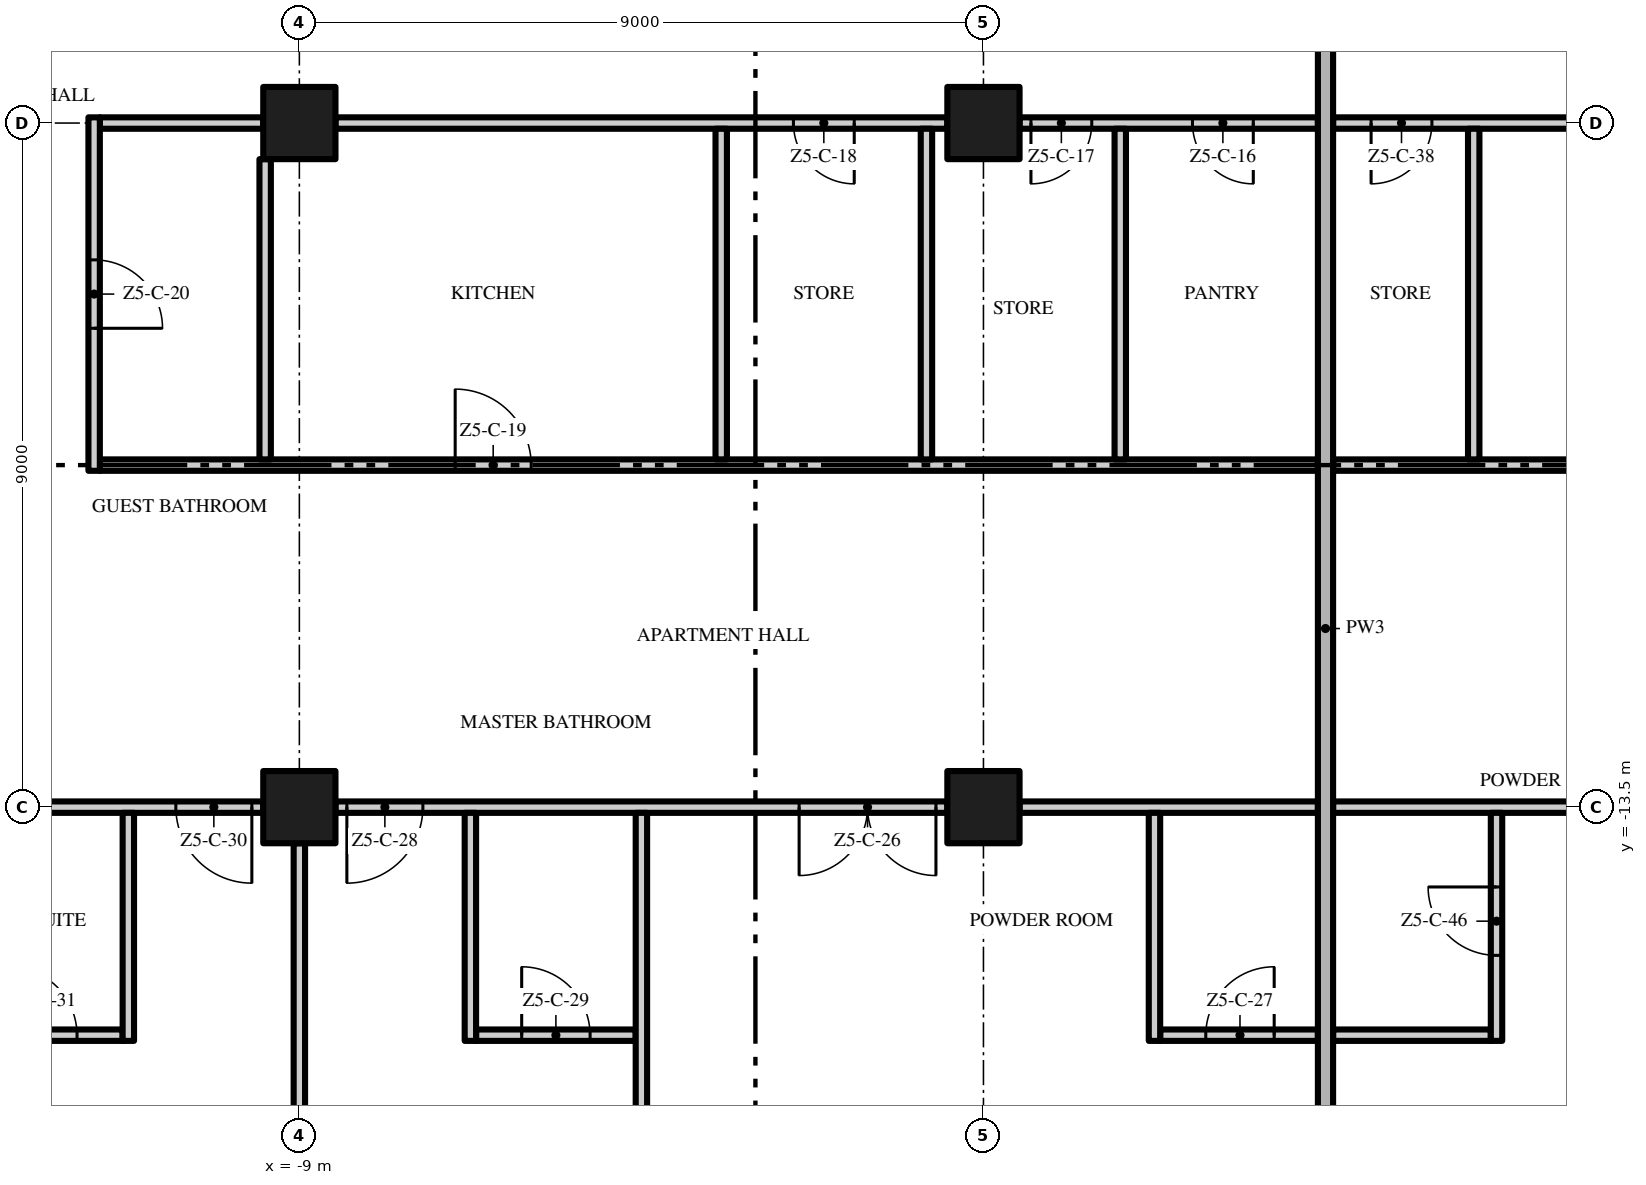
"""IFC4 building model, lengths in metres.
Left out: names, types, materials, properties, quantities, classifications, styles, units other than length and angle.
Written with IfcOpenShell. Run it as: python <this file> out.ifc"""

import sys

from ifc_helpers import new_model, si_unit, direction, frame, frame_2d, origin, origin_2d, place, context, subcontext, project, spatial, rectangle, extrude, element, fill, save


model = new_model("IFC4")
c1 = context("Model", 3, precision=1e-05, world=origin(), true_north=direction((0.0, 1.0)))
c2 = subcontext(c1, "Body", "Model", "MODEL_VIEW")
j1 = project(units=[si_unit("LENGTHUNIT", "METRE"), si_unit("PLANEANGLEUNIT", "RADIAN")], contexts=[c1])
p1 = place(None, origin())
s1 = spatial("IfcSite", under=j1, at=p1, CompositionType="ELEMENT")
p2 = place(p1, origin())
s2 = spatial("IfcBuilding", under=s1, at=p2, CompositionType="ELEMENT")
p3 = place(p2, frame((0.0, 0.0, 261.6)))
s3 = spatial("IfcBuildingStorey", under=s2, at=p3, CompositionType="ELEMENT", Elevation=261.6)
for number, where, z_axis, x_axis in (
    (1, (-9.0, -13.5, 0.0), (0.0, 0.0, 1.0), (1.0, 0.0, 0.0)),
    (2, (-9.0, -4.5, 0.0), (0.0, 0.0, 1.0), (1.0, 0.0, 0.0)),
    (3, (0.0, -13.5, 0.0), (0.0, 0.0, 1.0), (1.0, 0.0, 0.0)),
    (4, (0.0, -4.5, 0.0), (0.0, 0.0, 1.0), (1.0, 0.0, 0.0)),
):
    element("IfcColumn", number, at=place(p3, frame(where, z_axis=z_axis, x_axis=x_axis)), inside=s3, PredefinedType="COLUMN", context=c2, shape_type="SweptSolid", body=[
        extrude(rectangle(XDim=0.95, YDim=0.95, at=origin_2d()), origin(), (0.0, 0.0, 1.0), 3.5),
    ])
p4 = place(p3, frame((-13.425, -16.5, 0.0), z_axis=(0.0, 0.0, 1.0), x_axis=(1.0, 0.0, 0.0)))
e5 = element("IfcWall", 5, at=p4, inside=s3, PredefinedType="PARTITIONING", context=c2, shape_type="SweptSolid", body=[
    extrude(rectangle(XDim=2.1, YDim=0.15, at=frame_2d((1.05, 0.0))), origin(), (0.0, 0.0, 1.0), 3.5),
])
p5 = place(p4, frame((0.6, 0.0, 0.0)))
e6 = element("IfcOpeningElement", 6, at=p5, cuts=e5, PredefinedType="OPENING", context=c2, shape_type="SweptSolid", body=[
    extrude(rectangle(XDim=0.9, YDim=2.1, at=frame_2d((0.45, 1.05))), frame((0.0, 0.085, 0.0), z_axis=(0.0, -1.0, 0.0), x_axis=(1.0, 0.0, 0.0)), (0.0, 0.0, 1.0), 0.17),
])
p6 = place(p3, frame((-6.675, -16.5, 0.0), z_axis=(0.0, 0.0, 1.0), x_axis=(1.0, 0.0, 0.0)))
e7 = element("IfcWall", 7, at=p6, inside=s3, PredefinedType="PARTITIONING", context=c2, shape_type="SweptSolid", body=[
    extrude(rectangle(XDim=2.1, YDim=0.15, at=frame_2d((1.05, 0.0))), origin(), (0.0, 0.0, 1.0), 3.5),
])
p7 = place(p6, frame((0.6, 0.0, 0.0)))
e8 = element("IfcOpeningElement", 8, at=p7, cuts=e7, PredefinedType="OPENING", context=c2, shape_type="SweptSolid", body=[
    extrude(rectangle(XDim=0.9, YDim=2.1, at=frame_2d((0.45, 1.05))), frame((0.0, 0.085, 0.0), z_axis=(0.0, -1.0, 0.0), x_axis=(1.0, 0.0, 0.0)), (0.0, 0.0, 1.0), 0.17),
])
p8 = place(p3, frame((2.325, -16.5, 0.0), z_axis=(0.0, 0.0, 1.0), x_axis=(1.0, 0.0, 0.0)))
e9 = element("IfcWall", 9, at=p8, inside=s3, PredefinedType="PARTITIONING", context=c2, shape_type="SweptSolid", body=[
    extrude(rectangle(XDim=2.075, YDim=0.15, at=frame_2d((1.038, 0.0))), origin(), (0.0, 0.0, 1.0), 3.5),
])
p9 = place(p8, frame((0.6, 0.0, 0.0)))
e10 = element("IfcOpeningElement", 10, at=p9, cuts=e9, PredefinedType="OPENING", context=c2, shape_type="SweptSolid", body=[
    extrude(rectangle(XDim=0.9, YDim=2.1, at=frame_2d((0.45, 1.05))), frame((0.0, 0.085, 0.0), z_axis=(0.0, -1.0, 0.0), x_axis=(1.0, 0.0, 0.0)), (0.0, 0.0, 1.0), 0.17),
])
p10 = place(p3, frame((4.6, -16.5, 0.0), z_axis=(0.0, 0.0, 1.0), x_axis=(1.0, 0.0, 0.0)))
e11 = element("IfcWall", 11, at=p10, inside=s3, PredefinedType="PARTITIONING", context=c2, shape_type="SweptSolid", body=[
    extrude(rectangle(XDim=2.075, YDim=0.15, at=frame_2d((1.038, 0.0))), origin(), (0.0, 0.0, 1.0), 3.5),
])
p11 = place(p3, frame((-9.475, -13.5, 0.0), z_axis=(0.0, 0.0, 1.0), x_axis=(-1.0, 0.0, 0.0)))
e12 = element("IfcWall", 12, at=p11, inside=s3, PredefinedType="PARTITIONING", context=c2, shape_type="SweptSolid", body=[
    extrude(rectangle(XDim=8.05, YDim=0.15, at=frame_2d((4.025, 0.0))), origin(), (0.0, 0.0, 1.0), 3.5),
])
p12 = place(p11, frame((0.15, 0.0, 0.0)))
e13 = element("IfcOpeningElement", 13, at=p12, cuts=e12, PredefinedType="OPENING", context=c2, shape_type="SweptSolid", body=[
    extrude(rectangle(XDim=1.0, YDim=2.4, at=frame_2d((0.5, 1.2))), frame((0.0, 0.085, 0.0), z_axis=(0.0, -1.0, 0.0), x_axis=(1.0, 0.0, 0.0)), (0.0, 0.0, 1.0), 0.17),
])
p13 = place(p11, frame((6.9, 0.0, 0.0)))
e14 = element("IfcOpeningElement", 14, at=p13, cuts=e12, PredefinedType="OPENING", context=c2, shape_type="SweptSolid", body=[
    extrude(rectangle(XDim=1.0, YDim=2.4, at=frame_2d((0.5, 1.2))), frame((0.0, 0.085, 0.0), z_axis=(0.0, -1.0, 0.0), x_axis=(1.0, 0.0, 0.0)), (0.0, 0.0, 1.0), 0.17),
])
p14 = place(p3, frame((-0.475, -13.5, 0.0), z_axis=(0.0, 0.0, 1.0), x_axis=(-1.0, 0.0, 0.0)))
e15 = element("IfcWall", 15, at=p14, inside=s3, PredefinedType="PARTITIONING", context=c2, shape_type="SweptSolid", body=[
    extrude(rectangle(XDim=8.05, YDim=0.15, at=frame_2d((4.025, 0.0))), origin(), (0.0, 0.0, 1.0), 3.5),
])
p15 = place(p14, frame((0.15, 0.0, 0.0)))
e16 = element("IfcOpeningElement", 16, at=p15, cuts=e15, PredefinedType="OPENING", context=c2, shape_type="SweptSolid", body=[
    extrude(rectangle(XDim=1.8, YDim=2.4, at=frame_2d((0.9, 1.2))), frame((0.0, 0.085, 0.0), z_axis=(0.0, -1.0, 0.0), x_axis=(1.0, 0.0, 0.0)), (0.0, 0.0, 1.0), 0.17),
])
p16 = place(p14, frame((6.9, 0.0, 0.0)))
e17 = element("IfcOpeningElement", 17, at=p16, cuts=e15, PredefinedType="OPENING", context=c2, shape_type="SweptSolid", body=[
    extrude(rectangle(XDim=1.0, YDim=2.4, at=frame_2d((0.5, 1.2))), frame((0.0, 0.085, 0.0), z_axis=(0.0, -1.0, 0.0), x_axis=(1.0, 0.0, 0.0)), (0.0, 0.0, 1.0), 0.17),
])
for number, where, z_axis, x_axis in (
    (18, (0.475, -13.5, 0.0), (0.0, 0.0, 1.0), (1.0, 0.0, 0.0)),
    (19, (4.6, -13.5, 0.0), (0.0, 0.0, 1.0), (1.0, 0.0, 0.0)),
):
    element("IfcWall", number, at=place(p3, frame(where, z_axis=z_axis, x_axis=x_axis)), inside=s3, PredefinedType="PARTITIONING", context=c2, shape_type="SweptSolid", body=[
        extrude(rectangle(XDim=3.925, YDim=0.15, at=frame_2d((1.962, 0.0))), origin(), (0.0, 0.0, 1.0), 3.5),
    ])
p17 = place(p3, frame((-11.625, -9.0, 0.0), z_axis=(0.0, 0.0, 1.0), x_axis=(1.0, 0.0, 0.0)))
e20 = element("IfcWall", 20, at=p17, inside=s3, PredefinedType="PARTITIONING", context=c2, shape_type="SweptSolid", body=[
    extrude(rectangle(XDim=16.025, YDim=0.15, at=frame_2d((8.012, 0.0))), origin(), (0.0, 0.0, 1.0), 3.5),
])
p18 = place(p17, frame((4.675, 0.0, 0.0)))
e21 = element("IfcOpeningElement", 21, at=p18, cuts=e20, PredefinedType="OPENING", context=c2, shape_type="SweptSolid", body=[
    extrude(rectangle(XDim=1.0, YDim=2.4, at=frame_2d((0.5, 1.2))), frame((0.0, 0.085, 0.0), z_axis=(0.0, -1.0, 0.0), x_axis=(1.0, 0.0, 0.0)), (0.0, 0.0, 1.0), 0.17),
])
p19 = place(p3, frame((4.6, -9.0, 0.0), z_axis=(0.0, 0.0, 1.0), x_axis=(1.0, 0.0, 0.0)))
e22 = element("IfcWall", 22, at=p19, inside=s3, PredefinedType="PARTITIONING", context=c2, shape_type="SweptSolid", body=[
    extrude(rectangle(XDim=10.025, YDim=0.15, at=frame_2d((5.013, 0.0))), origin(), (0.0, 0.0, 1.0), 3.5),
])
p20 = place(p19, frame((4.35, 0.0, 0.0)))
e23 = element("IfcOpeningElement", 23, at=p20, cuts=e22, PredefinedType="OPENING", context=c2, shape_type="SweptSolid", body=[
    extrude(rectangle(XDim=1.0, YDim=2.4, at=frame_2d((0.5, 1.2))), frame((0.0, 0.085, 0.0), z_axis=(0.0, -1.0, 0.0), x_axis=(1.0, 0.0, 0.0)), (0.0, 0.0, 1.0), 0.17),
])
p21 = place(p3, frame((-11.625, -4.5, 0.0), z_axis=(0.0, 0.0, 1.0), x_axis=(1.0, 0.0, 0.0)))
e24 = element("IfcWall", 24, at=p21, inside=s3, PredefinedType="PARTITIONING", context=c2, shape_type="SweptSolid", body=[
    extrude(rectangle(XDim=2.15, YDim=0.15, at=frame_2d((1.075, 0.0))), origin(), (0.0, 0.0, 1.0), 3.5),
])
p22 = place(p3, frame((-0.475, -4.5, 0.0), z_axis=(0.0, 0.0, 1.0), x_axis=(-1.0, 0.0, 0.0)))
e25 = element("IfcWall", 25, at=p22, inside=s3, PredefinedType="PARTITIONING", context=c2, shape_type="SweptSolid", body=[
    extrude(rectangle(XDim=8.05, YDim=0.15, at=frame_2d((4.025, 0.0))), origin(), (0.0, 0.0, 1.0), 3.5),
])
p23 = place(p22, frame((1.225, 0.0, 0.0)))
e26 = element("IfcOpeningElement", 26, at=p23, cuts=e25, PredefinedType="OPENING", context=c2, shape_type="SweptSolid", body=[
    extrude(rectangle(XDim=0.8, YDim=2.0, at=frame_2d((0.4, 1.0))), frame((0.0, 0.085, 0.0), z_axis=(0.0, -1.0, 0.0), x_axis=(1.0, 0.0, 0.0)), (0.0, 0.0, 1.0), 0.17),
])
p24 = place(p3, frame((4.4, -4.5, 0.0), z_axis=(0.0, 0.0, 1.0), x_axis=(-1.0, 0.0, 0.0)))
e27 = element("IfcWall", 27, at=p24, inside=s3, PredefinedType="PARTITIONING", context=c2, shape_type="SweptSolid", body=[
    extrude(rectangle(XDim=3.925, YDim=0.15, at=frame_2d((1.962, 0.0))), origin(), (0.0, 0.0, 1.0), 3.5),
])
p25 = place(p24, frame((0.85, 0.0, 0.0)))
e28 = element("IfcOpeningElement", 28, at=p25, cuts=e27, PredefinedType="OPENING", context=c2, shape_type="SweptSolid", body=[
    extrude(rectangle(XDim=0.8, YDim=2.0, at=frame_2d((0.4, 1.0))), frame((0.0, 0.085, 0.0), z_axis=(0.0, -1.0, 0.0), x_axis=(1.0, 0.0, 0.0)), (0.0, 0.0, 1.0), 0.17),
])
p26 = place(p24, frame((2.975, 0.0, 0.0)))
e29 = element("IfcOpeningElement", 29, at=p26, cuts=e27, PredefinedType="OPENING", context=c2, shape_type="SweptSolid", body=[
    extrude(rectangle(XDim=0.8, YDim=2.0, at=frame_2d((0.4, 1.0))), frame((0.0, 0.085, 0.0), z_axis=(0.0, -1.0, 0.0), x_axis=(1.0, 0.0, 0.0)), (0.0, 0.0, 1.0), 0.17),
])
p27 = place(p3, frame((8.525, -4.5, 0.0), z_axis=(0.0, 0.0, 1.0), x_axis=(-1.0, 0.0, 0.0)))
e30 = element("IfcWall", 30, at=p27, inside=s3, PredefinedType="PARTITIONING", context=c2, shape_type="SweptSolid", body=[
    extrude(rectangle(XDim=3.925, YDim=0.15, at=frame_2d((1.962, 0.0))), origin(), (0.0, 0.0, 1.0), 3.5),
])
p28 = place(p27, frame((2.625, 0.0, 0.0)))
e31 = element("IfcOpeningElement", 31, at=p28, cuts=e30, PredefinedType="OPENING", context=c2, shape_type="SweptSolid", body=[
    extrude(rectangle(XDim=0.8, YDim=2.0, at=frame_2d((0.4, 1.0))), frame((0.0, 0.085, 0.0), z_axis=(0.0, -1.0, 0.0), x_axis=(1.0, 0.0, 0.0)), (0.0, 0.0, 1.0), 0.17),
])
p29 = place(p3, frame((-11.7, -4.425, 0.0), z_axis=(0.0, 0.0, 1.0), x_axis=(0.0, -1.0, 0.0)))
e32 = element("IfcWall", 32, at=p29, inside=s3, PredefinedType="PARTITIONING", context=c2, shape_type="SweptSolid", body=[
    extrude(rectangle(XDim=4.65, YDim=0.15, at=frame_2d((2.325, 0.0))), origin(), (0.0, 0.0, 1.0), 3.5),
])
p30 = place(p29, frame((1.875, 0.0, 0.0)))
e33 = element("IfcOpeningElement", 33, at=p30, cuts=e32, PredefinedType="OPENING", context=c2, shape_type="SweptSolid", body=[
    extrude(rectangle(XDim=0.9, YDim=2.1, at=frame_2d((0.45, 1.05))), frame((0.0, 0.085, 0.0), z_axis=(0.0, -1.0, 0.0), x_axis=(1.0, 0.0, 0.0)), (0.0, 0.0, 1.0), 0.17),
])
p31 = place(p3, frame((-11.25, -16.575, 0.0), z_axis=(0.0, 0.0, 1.0), x_axis=(0.0, 1.0, 0.0)))
e34 = element("IfcWall", 34, at=p31, inside=s3, PredefinedType="PARTITIONING", context=c2, shape_type="SweptSolid", body=[
    extrude(rectangle(XDim=3.0, YDim=0.15, at=frame_2d((1.5, 0.0))), origin(), (0.0, 0.0, 1.0), 3.5),
])
p32 = place(p3, frame((-9.45, -8.925, 0.0), z_axis=(0.0, 0.0, 1.0), x_axis=(0.0, 1.0, 0.0)))
e35 = element("IfcWall", 35, at=p32, inside=s3, PredefinedType="PARTITIONING", context=c2, shape_type="SweptSolid", body=[
    extrude(rectangle(XDim=3.95, YDim=0.15, at=frame_2d((1.975, 0.0))), origin(), (0.0, 0.0, 1.0), 3.5),
])
p33 = place(p3, frame((-9.0, -21.6, 0.0), z_axis=(0.0, 0.0, 1.0), x_axis=(0.0, 1.0, 0.0)))
e36 = element("IfcWall", 36, at=p33, inside=s3, PredefinedType="PARTITIONING", context=c2, shape_type="SweptSolid", body=[
    extrude(rectangle(XDim=7.625, YDim=0.15, at=frame_2d((3.812, 0.0))), origin(), (0.0, 0.0, 1.0), 3.5),
])
p34 = place(p3, frame((-6.75, -16.575, 0.0), z_axis=(0.0, 0.0, 1.0), x_axis=(0.0, 1.0, 0.0)))
e37 = element("IfcWall", 37, at=p34, inside=s3, PredefinedType="PARTITIONING", context=c2, shape_type="SweptSolid", body=[
    extrude(rectangle(XDim=3.0, YDim=0.15, at=frame_2d((1.5, 0.0))), origin(), (0.0, 0.0, 1.0), 3.5),
])
p35 = place(p3, frame((-4.5, -22.2, 0.0), z_axis=(0.0, 0.0, 1.0), x_axis=(0.0, 1.0, 0.0)))
e38 = element("IfcWall", 38, at=p35, inside=s3, PredefinedType="PARTITIONING", context=c2, shape_type="SweptSolid", body=[
    extrude(rectangle(XDim=8.625, YDim=0.15, at=frame_2d((4.312, 0.0))), origin(), (0.0, 0.0, 1.0), 3.5),
])
for number, where, z_axis, x_axis in (
    (39, (-3.45, -8.925, 0.0), (0.0, 0.0, 1.0), (0.0, 1.0, 0.0)),
    (40, (-0.75, -8.925, 0.0), (0.0, 0.0, 1.0), (0.0, 1.0, 0.0)),
    (41, (1.8, -8.925, 0.0), (0.0, 0.0, 1.0), (0.0, 1.0, 0.0)),
):
    element("IfcWall", number, at=place(p3, frame(where, z_axis=z_axis, x_axis=x_axis)), inside=s3, PredefinedType="PARTITIONING", context=c2, shape_type="SweptSolid", body=[
        extrude(rectangle(XDim=4.35, YDim=0.15, at=frame_2d((2.175, 0.0))), origin(), (0.0, 0.0, 1.0), 3.5),
    ])
p36 = place(p3, frame((2.25, -16.575, 0.0), z_axis=(0.0, 0.0, 1.0), x_axis=(0.0, 1.0, 0.0)))
e42 = element("IfcWall", 42, at=p36, inside=s3, PredefinedType="PARTITIONING", context=c2, shape_type="SweptSolid", body=[
    extrude(rectangle(XDim=3.0, YDim=0.15, at=frame_2d((1.5, 0.0))), origin(), (0.0, 0.0, 1.0), 3.5),
])
p37 = place(p3, frame((4.5, -22.2, 0.0), z_axis=(0.0, 0.0, 1.0), x_axis=(0.0, 1.0, 0.0)))
e43 = element("IfcWall", 43, at=p37, inside=s3, PredefinedType="PARTITIONING", context=c2, shape_type="SweptSolid", body=[
    extrude(rectangle(XDim=22.1, YDim=0.2, at=frame_2d((11.05, 0.0))), origin(), (0.0, 0.0, 1.0), 3.5),
])
p38 = place(p3, frame((6.45, -8.925, 0.0), z_axis=(0.0, 0.0, 1.0), x_axis=(0.0, 1.0, 0.0)))
e44 = element("IfcWall", 44, at=p38, inside=s3, PredefinedType="PARTITIONING", context=c2, shape_type="SweptSolid", body=[
    extrude(rectangle(XDim=4.35, YDim=0.15, at=frame_2d((2.175, 0.0))), origin(), (0.0, 0.0, 1.0), 3.5),
])
p39 = place(p3, frame((6.75, -16.575, 0.0), z_axis=(0.0, 0.0, 1.0), x_axis=(0.0, 1.0, 0.0)))
e45 = element("IfcWall", 45, at=p39, inside=s3, PredefinedType="PARTITIONING", context=c2, shape_type="SweptSolid", body=[
    extrude(rectangle(XDim=3.0, YDim=0.15, at=frame_2d((1.5, 0.0))), origin(), (0.0, 0.0, 1.0), 3.5),
])
p40 = place(p39, frame((1.125, 0.0, 0.0)))
e46 = element("IfcOpeningElement", 46, at=p40, cuts=e45, PredefinedType="OPENING", context=c2, shape_type="SweptSolid", body=[
    extrude(rectangle(XDim=0.9, YDim=2.1, at=frame_2d((0.45, 1.05))), frame((0.0, 0.085, 0.0), z_axis=(0.0, -1.0, 0.0), x_axis=(1.0, 0.0, 0.0)), (0.0, 0.0, 1.0), 0.17),
])
p41 = place(p25, origin())
e47 = element("IfcDoor", 47, at=p41, inside=s3, OperationType="SINGLE_SWING_LEFT", PredefinedType="DOOR", context=c2, shape_type="SweptSolid", body=[
    extrude(rectangle(XDim=0.8, YDim=2.0, at=frame_2d((0.4, 1.0))), frame((0.0, 0.025, 0.0), z_axis=(0.0, -1.0, 0.0), x_axis=(1.0, 0.0, 0.0)), (0.0, 0.0, 1.0), 0.05),
])
fill(e28, e47)
p42 = place(p26, origin())
e48 = element("IfcDoor", 48, at=p42, inside=s3, OperationType="SINGLE_SWING_RIGHT", PredefinedType="DOOR", context=c2, shape_type="SweptSolid", body=[
    extrude(rectangle(XDim=0.8, YDim=2.0, at=frame_2d((0.4, 1.0))), frame((0.0, 0.025, 0.0), z_axis=(0.0, -1.0, 0.0), x_axis=(1.0, 0.0, 0.0)), (0.0, 0.0, 1.0), 0.05),
])
fill(e29, e48)
p43 = place(p23, origin())
e49 = element("IfcDoor", 49, at=p43, inside=s3, OperationType="SINGLE_SWING_LEFT", PredefinedType="DOOR", context=c2, shape_type="SweptSolid", body=[
    extrude(rectangle(XDim=0.8, YDim=2.0, at=frame_2d((0.4, 1.0))), frame((0.0, 0.025, 0.0), z_axis=(0.0, -1.0, 0.0), x_axis=(1.0, 0.0, 0.0)), (0.0, 0.0, 1.0), 0.05),
])
fill(e26, e49)
p44 = place(p18, origin())
e50 = element("IfcDoor", 50, at=p44, inside=s3, OperationType="SINGLE_SWING_LEFT", PredefinedType="DOOR", context=c2, shape_type="SweptSolid", body=[
    extrude(rectangle(XDim=1.0, YDim=2.4, at=frame_2d((0.5, 1.2))), frame((0.0, 0.025, 0.0), z_axis=(0.0, -1.0, 0.0), x_axis=(1.0, 0.0, 0.0)), (0.0, 0.0, 1.0), 0.05),
])
fill(e21, e50)
p45 = place(p30, origin())
e51 = element("IfcDoor", 51, at=p45, inside=s3, OperationType="SINGLE_SWING_RIGHT", PredefinedType="DOOR", context=c2, shape_type="SweptSolid", body=[
    extrude(rectangle(XDim=0.9, YDim=2.1, at=frame_2d((0.45, 1.05))), frame((0.0, 0.025, 0.0), z_axis=(0.0, -1.0, 0.0), x_axis=(1.0, 0.0, 0.0)), (0.0, 0.0, 1.0), 0.05),
])
fill(e33, e51)
p46 = place(p15, origin())
e52 = element("IfcDoor", 52, at=p46, inside=s3, OperationType="DOUBLE_DOOR_SINGLE_SWING", PredefinedType="DOOR", context=c2, shape_type="SweptSolid", body=[
    extrude(rectangle(XDim=1.8, YDim=2.4, at=frame_2d((0.9, 1.2))), frame((0.0, 0.025, 0.0), z_axis=(0.0, -1.0, 0.0), x_axis=(1.0, 0.0, 0.0)), (0.0, 0.0, 1.0), 0.05),
])
fill(e16, e52)
p47 = place(p9, origin())
e53 = element("IfcDoor", 53, at=p47, inside=s3, OperationType="SINGLE_SWING_RIGHT", PredefinedType="DOOR", context=c2, shape_type="SweptSolid", body=[
    extrude(rectangle(XDim=0.9, YDim=2.1, at=frame_2d((0.45, 1.05))), frame((0.0, 0.025, 0.0), z_axis=(0.0, -1.0, 0.0), x_axis=(1.0, 0.0, 0.0)), (0.0, 0.0, 1.0), 0.05),
])
fill(e10, e53)
p48 = place(p16, origin())
e54 = element("IfcDoor", 54, at=p48, inside=s3, OperationType="SINGLE_SWING_RIGHT", PredefinedType="DOOR", context=c2, shape_type="SweptSolid", body=[
    extrude(rectangle(XDim=1.0, YDim=2.4, at=frame_2d((0.5, 1.2))), frame((0.0, 0.025, 0.0), z_axis=(0.0, -1.0, 0.0), x_axis=(1.0, 0.0, 0.0)), (0.0, 0.0, 1.0), 0.05),
])
fill(e17, e54)
p49 = place(p7, origin())
e55 = element("IfcDoor", 55, at=p49, inside=s3, OperationType="SINGLE_SWING_LEFT", PredefinedType="DOOR", context=c2, shape_type="SweptSolid", body=[
    extrude(rectangle(XDim=0.9, YDim=2.1, at=frame_2d((0.45, 1.05))), frame((0.0, 0.025, 0.0), z_axis=(0.0, -1.0, 0.0), x_axis=(1.0, 0.0, 0.0)), (0.0, 0.0, 1.0), 0.05),
])
fill(e8, e55)
p50 = place(p12, origin())
e56 = element("IfcDoor", 56, at=p50, inside=s3, OperationType="SINGLE_SWING_LEFT", PredefinedType="DOOR", context=c2, shape_type="SweptSolid", body=[
    extrude(rectangle(XDim=1.0, YDim=2.4, at=frame_2d((0.5, 1.2))), frame((0.0, 0.025, 0.0), z_axis=(0.0, -1.0, 0.0), x_axis=(1.0, 0.0, 0.0)), (0.0, 0.0, 1.0), 0.05),
])
fill(e13, e56)
p51 = place(p5, origin())
e57 = element("IfcDoor", 57, at=p51, inside=s3, OperationType="SINGLE_SWING_LEFT", PredefinedType="DOOR", context=c2, shape_type="SweptSolid", body=[
    extrude(rectangle(XDim=0.9, YDim=2.1, at=frame_2d((0.45, 1.05))), frame((0.0, 0.025, 0.0), z_axis=(0.0, -1.0, 0.0), x_axis=(1.0, 0.0, 0.0)), (0.0, 0.0, 1.0), 0.05),
])
fill(e6, e57)
p52 = place(p28, origin())
e58 = element("IfcDoor", 58, at=p52, inside=s3, OperationType="SINGLE_SWING_RIGHT", PredefinedType="DOOR", context=c2, shape_type="SweptSolid", body=[
    extrude(rectangle(XDim=0.8, YDim=2.0, at=frame_2d((0.4, 1.0))), frame((0.0, 0.025, 0.0), z_axis=(0.0, -1.0, 0.0), x_axis=(1.0, 0.0, 0.0)), (0.0, 0.0, 1.0), 0.05),
])
fill(e31, e58)
p53 = place(p40, origin())
e59 = element("IfcDoor", 59, at=p53, inside=s3, OperationType="SINGLE_SWING_RIGHT", PredefinedType="DOOR", context=c2, shape_type="SweptSolid", body=[
    extrude(rectangle(XDim=0.9, YDim=2.1, at=frame_2d((0.45, 1.05))), frame((0.0, 0.025, 0.0), z_axis=(0.0, -1.0, 0.0), x_axis=(1.0, 0.0, 0.0)), (0.0, 0.0, 1.0), 0.05),
])
fill(e46, e59)
save(model, sys.argv[1])
